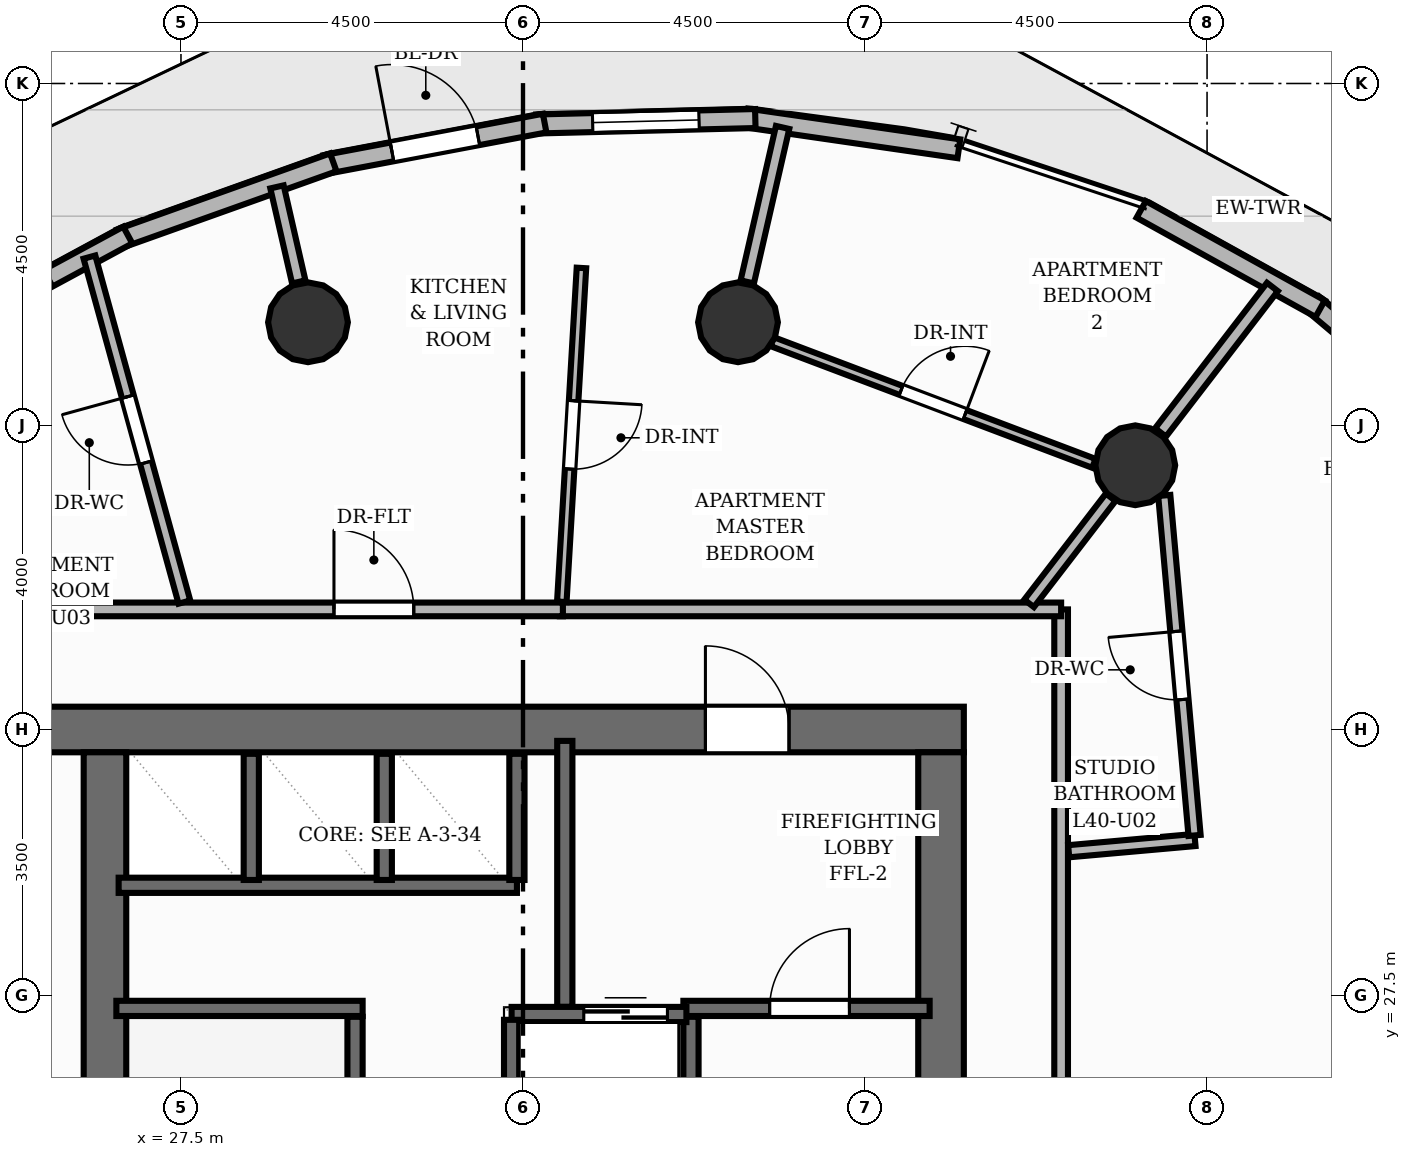
"""IFC4 building model, lengths in metres.
Left out: names, types, materials, properties, quantities, classifications, styles, units other than length and angle.
Written with IfcOpenShell. Run it as: python <this file> out.ifc"""

import sys

from ifc_helpers import new_model, si_unit, direction, frame, frame_2d, origin, origin_2d, place, context, subcontext, project, spatial, rectangle, circle, extrude, element, fill, save


model = new_model("IFC4")
c1 = context("Model", 3, precision=1e-05, world=origin(), true_north=direction((0.0, 1.0)))
c2 = subcontext(c1, "Body", "Model", "MODEL_VIEW")
j1 = project(units=[si_unit("LENGTHUNIT", "METRE"), si_unit("PLANEANGLEUNIT", "RADIAN")], contexts=[c1])
p1 = place(None, origin())
s1 = spatial("IfcSite", under=j1, at=p1, CompositionType="ELEMENT")
p2 = place(p1, origin())
s2 = spatial("IfcBuilding", under=s1, at=p2, CompositionType="ELEMENT")
p3 = place(p2, frame((0.0, 0.0, 136.16)))
s3 = spatial("IfcBuildingStorey", under=s2, at=p3, CompositionType="ELEMENT", Elevation=136.16)
p4 = place(p3, frame((22.7, 31.0, 0.0), z_axis=(0.0, 0.0, 1.0), x_axis=(1.0, 0.0, 0.0)))
e1 = element("IfcWall", 1, at=p4, inside=s3, PredefinedType="SHEAR", context=c2, shape_type="SweptSolid", body=[
    extrude(rectangle(XDim=15.1, YDim=0.6, at=frame_2d((7.55, 0.0))), origin(), (0.0, 0.0, 1.0), 3.2),
])
p5 = place(p4, frame((11.7, 0.0, 0.0)))
e2 = element("IfcOpeningElement", 2, at=p5, cuts=e1, PredefinedType="OPENING", context=c2, shape_type="SweptSolid", body=[
    extrude(rectangle(XDim=1.1, YDim=2.15, at=frame_2d((0.55, 1.075))), frame((0.0, 0.31, 0.0), z_axis=(0.0, -1.0, 0.0), x_axis=(1.0, 0.0, 0.0)), (0.0, 0.0, 1.0), 0.62),
])
p6 = place(p3, frame((37.5, 17.3, 0.0), z_axis=(0.0, 0.0, 1.0), x_axis=(0.0, 1.0, 0.0)))
e3 = element("IfcWall", 3, at=p6, inside=s3, PredefinedType="SHEAR", context=c2, shape_type="SweptSolid", body=[
    extrude(rectangle(XDim=13.4, YDim=0.6, at=frame_2d((6.7, 0.0))), origin(), (0.0, 0.0, 1.0), 3.2),
])
p7 = place(p3, frame((26.5, 17.3, 0.0), z_axis=(0.0, 0.0, 1.0), x_axis=(0.0, 1.0, 0.0)))
e4 = element("IfcWall", 4, at=p7, inside=s3, PredefinedType="SHEAR", context=c2, shape_type="SweptSolid", body=[
    extrude(rectangle(XDim=13.4, YDim=0.56, at=frame_2d((6.7, 0.0))), origin(), (0.0, 0.0, 1.0), 3.2),
])
for number, where, z_axis, x_axis in (
    (5, (40.056, 34.477, 0.0), (0.0, 0.0, 1.0), (1.0, 0.0, 0.0)),
    (6, (34.829, 36.358, 0.0), (0.0, 0.0, 1.0), (1.0, 0.0, 0.0)),
    (7, (29.171, 36.358, 0.0), (0.0, 0.0, 1.0), (1.0, 0.0, 0.0)),
):
    element("IfcColumn", number, at=place(p3, frame(where, z_axis=z_axis, x_axis=x_axis)), inside=s3, PredefinedType="COLUMN", context=c2, shape_type="SweptSolid", body=[
        extrude(circle(Radius=0.525, at=origin_2d()), origin(), (0.0, 0.0, 1.0), 3.2),
    ])
p8 = place(p3, frame((42.395, 36.601, 0.0), z_axis=(0.0, 0.0, 1.0), x_axis=(0.764825125467, -0.644237943197, 0.0)))
e8 = element("IfcWall", 8, at=p8, inside=s3, PredefinedType="SOLIDWALL", context=c2, shape_type="SweptSolid", body=[
    extrude(rectangle(XDim=2.648, YDim=0.25, at=frame_2d((1.324, 0.0))), origin(), (0.0, 0.0, 1.0), 2.96),
])
p9 = place(p8, frame((0.624, 0.0, 0.85)))
e9 = element("IfcOpeningElement", 9, at=p9, cuts=e8, PredefinedType="OPENING", context=c2, shape_type="SweptSolid", body=[
    extrude(rectangle(XDim=1.4, YDim=1.55, at=frame_2d((0.7, 0.775))), frame((0.0, 0.135, 0.0), z_axis=(0.0, -1.0, 0.0), x_axis=(1.0, 0.0, 0.0)), (0.0, 0.0, 1.0), 0.27),
])
p10 = place(p3, frame((40.134, 37.844, 0.0), z_axis=(0.0, 0.0, 1.0), x_axis=(0.874341102682, -0.485311895755, 0.0)))
e10 = element("IfcWall", 10, at=p10, inside=s3, PredefinedType="SOLIDWALL", context=c2, shape_type="SweptSolid", body=[
    extrude(rectangle(XDim=2.693, YDim=0.25, at=frame_2d((1.346, 0.0))), origin(), (0.0, 0.0, 1.0), 2.96),
])
p11 = place(p3, frame((34.946, 39.045, 0.0), z_axis=(0.0, 0.0, 1.0), x_axis=(0.98966505468, -0.143398324768, 0.0)))
e11 = element("IfcWall", 11, at=p11, inside=s3, PredefinedType="SOLIDWALL", context=c2, shape_type="SweptSolid", body=[
    extrude(rectangle(XDim=2.818, YDim=0.25, at=frame_2d((1.409, 0.0))), origin(), (0.0, 0.0, 1.0), 2.96),
])
p12 = place(p3, frame((32.176, 38.967, 0.0), z_axis=(0.0, 0.0, 1.0), x_axis=(0.999687646408, 0.02499219116, 0.0)))
e12 = element("IfcWall", 12, at=p12, inside=s3, PredefinedType="SOLIDWALL", context=c2, shape_type="SweptSolid", body=[
    extrude(rectangle(XDim=2.882, YDim=0.25, at=frame_2d((1.441, 0.0))), origin(), (0.0, 0.0, 1.0), 2.96),
])
p13 = place(p12, frame((0.741, 0.0, 0.85)))
e13 = element("IfcOpeningElement", 13, at=p13, cuts=e12, PredefinedType="OPENING", context=c2, shape_type="SweptSolid", body=[
    extrude(rectangle(XDim=1.4, YDim=1.55, at=frame_2d((0.7, 0.775))), frame((0.0, 0.135, 0.0), z_axis=(0.0, -1.0, 0.0), x_axis=(1.0, 0.0, 0.0)), (0.0, 0.0, 1.0), 0.27),
])
p14 = place(p3, frame((29.399, 38.434, 0.0), z_axis=(0.0, 0.0, 1.0), x_axis=(0.982637070109, 0.185538105108, 0.0)))
e14 = element("IfcWall", 14, at=p14, inside=s3, PredefinedType="SOLIDWALL", context=c2, shape_type="SweptSolid", body=[
    extrude(rectangle(XDim=2.937, YDim=0.25, at=frame_2d((1.469, 0.0))), origin(), (0.0, 0.0, 1.0), 2.96),
])
p15 = place(p14, frame((0.893, 0.0, 0.0)))
e15 = element("IfcOpeningElement", 15, at=p15, cuts=e14, PredefinedType="OPENING", context=c2, shape_type="SweptSolid", body=[
    extrude(rectangle(XDim=1.15, YDim=2.2, at=frame_2d((0.575, 1.1))), frame((0.0, 0.135, 0.0), z_axis=(0.0, -1.0, 0.0), x_axis=(1.0, 0.0, 0.0)), (0.0, 0.0, 1.0), 0.27),
])
p16 = place(p3, frame((26.701, 37.461, 0.0), z_axis=(0.0, 0.0, 1.0), x_axis=(0.94175304307, 0.33630522724, 0.0)))
e16 = element("IfcWall", 16, at=p16, inside=s3, PredefinedType="SOLIDWALL", context=c2, shape_type="SweptSolid", body=[
    extrude(rectangle(XDim=2.977, YDim=0.25, at=frame_2d((1.489, 0.0))), origin(), (0.0, 0.0, 1.0), 2.96),
])
p17 = place(p3, frame((24.163, 36.079, 0.0), z_axis=(0.0, 0.0, 1.0), x_axis=(0.879567466611, 0.475774181393, 0.0)))
e17 = element("IfcWall", 17, at=p17, inside=s3, PredefinedType="SOLIDWALL", context=c2, shape_type="SweptSolid", body=[
    extrude(rectangle(XDim=2.998, YDim=0.25, at=frame_2d((1.499, 0.0))), origin(), (0.0, 0.0, 1.0), 2.96),
])
p18 = place(p17, frame((0.175, 0.0, 0.85)))
e18 = element("IfcOpeningElement", 18, at=p18, cuts=e17, PredefinedType="OPENING", context=c2, shape_type="SweptSolid", body=[
    extrude(rectangle(XDim=1.65, YDim=1.55, at=frame_2d((0.825, 0.775))), frame((0.0, 0.135, 0.0), z_axis=(0.0, -1.0, 0.0), x_axis=(1.0, 0.0, 0.0)), (0.0, 0.0, 1.0), 0.27),
])
p19 = place(p3, frame((29.79, 20.78, 0.0), z_axis=(0.0, 0.0, 1.0), x_axis=(0.0, 1.0, 0.0)))
e19 = element("IfcWall", 19, at=p19, inside=s3, PredefinedType="SHEAR", context=c2, shape_type="SweptSolid", body=[
    extrude(rectangle(XDim=6.44, YDim=0.2, at=frame_2d((3.22, 0.0))), origin(), (0.0, 0.0, 1.0), 3.2),
])
p20 = place(p3, frame((26.65, 27.33, 0.0), z_axis=(0.0, 0.0, 1.0), x_axis=(1.0, 0.0, 0.0)))
e20 = element("IfcWall", 20, at=p20, inside=s3, PredefinedType="SHEAR", context=c2, shape_type="SweptSolid", body=[
    extrude(rectangle(XDim=3.24, YDim=0.2, at=frame_2d((1.62, 0.0))), origin(), (0.0, 0.0, 1.0), 3.2),
])
p21 = place(p3, frame((34.21, 20.78, 0.0), z_axis=(0.0, 0.0, 1.0), x_axis=(0.0, 1.0, 0.0)))
e21 = element("IfcWall", 21, at=p21, inside=s3, PredefinedType="SHEAR", context=c2, shape_type="SweptSolid", body=[
    extrude(rectangle(XDim=6.44, YDim=0.2, at=frame_2d((3.22, 0.0))), origin(), (0.0, 0.0, 1.0), 3.2),
])
p22 = place(p3, frame((34.11, 27.33, 0.0), z_axis=(0.0, 0.0, 1.0), x_axis=(1.0, 0.0, 0.0)))
e22 = element("IfcWall", 22, at=p22, inside=s3, PredefinedType="SHEAR", context=c2, shape_type="SweptSolid", body=[
    extrude(rectangle(XDim=3.24, YDim=0.2, at=frame_2d((1.62, 0.0))), origin(), (0.0, 0.0, 1.0), 3.2),
])
p23 = place(p22, frame((1.135, 0.0, 0.0)))
e23 = element("IfcOpeningElement", 23, at=p23, cuts=e22, PredefinedType="OPENING", context=c2, shape_type="SweptSolid", body=[
    extrude(rectangle(XDim=1.05, YDim=2.15, at=frame_2d((0.525, 1.075))), frame((0.0, 0.11, 0.0), z_axis=(0.0, -1.0, 0.0), x_axis=(1.0, 0.0, 0.0)), (0.0, 0.0, 1.0), 0.22),
])
p24 = place(p3, frame((32.55, 27.35, 0.0), z_axis=(0.0, 0.0, 1.0), x_axis=(0.0, 1.0, 0.0)))
e24 = element("IfcWall", 24, at=p24, inside=s3, PredefinedType="SHEAR", context=c2, shape_type="SweptSolid", body=[
    extrude(rectangle(XDim=3.5, YDim=0.2, at=frame_2d((1.75, 0.0))), origin(), (0.0, 0.0, 1.0), 3.2),
])
p25 = place(p3, frame((31.85, 27.25, 0.0), z_axis=(0.0, 0.0, 1.0), x_axis=(1.0, 0.0, 0.0)))
e25 = element("IfcWall", 25, at=p25, inside=s3, PredefinedType="SHEAR", context=c2, shape_type="SweptSolid", body=[
    extrude(rectangle(XDim=2.3, YDim=0.2, at=frame_2d((1.15, 0.0))), origin(), (0.0, 0.0, 1.0), 3.2),
])
p26 = place(p25, frame((0.95, 0.0, 0.0)))
e26 = element("IfcOpeningElement", 26, at=p26, cuts=e25, PredefinedType="OPENING", context=c2, shape_type="SweptSolid", body=[
    extrude(rectangle(XDim=1.1, YDim=2.15, at=frame_2d((0.55, 1.075))), frame((0.0, 0.11, 0.0), z_axis=(0.0, -1.0, 0.0), x_axis=(1.0, 0.0, 0.0)), (0.0, 0.0, 1.0), 0.22),
])
p27 = place(p3, frame((31.85, 25.47, 0.0), z_axis=(0.0, 0.0, 1.0), x_axis=(0.0, 1.0, 0.0)))
e27 = element("IfcWall", 27, at=p27, inside=s3, PredefinedType="SHEAR", context=c2, shape_type="SweptSolid", body=[
    extrude(rectangle(XDim=1.71, YDim=0.2, at=frame_2d((0.855, 0.0))), origin(), (0.0, 0.0, 1.0), 3.2),
])
p28 = place(p3, frame((26.68, 28.95, 0.0), z_axis=(0.0, 0.0, 1.0), x_axis=(1.0, 0.0, 0.0)))
e28 = element("IfcWall", 28, at=p28, inside=s3, PredefinedType="SHEAR", context=c2, shape_type="SweptSolid", body=[
    extrude(rectangle(XDim=5.24, YDim=0.2, at=frame_2d((2.62, 0.0))), origin(), (0.0, 0.0, 1.0), 3.2),
])
for number, where, z_axis, x_axis in (
    (29, (31.92, 29.02, 0.0), (0.0, 0.0, 1.0), (0.0, 1.0, 0.0)),
    (30, (28.425, 29.02, 0.0), (0.0, 0.0, 1.0), (0.0, 1.0, 0.0)),
    (31, (30.175, 29.02, 0.0), (0.0, 0.0, 1.0), (0.0, 1.0, 0.0)),
):
    element("IfcWall", number, at=place(p3, frame(where, z_axis=z_axis, x_axis=x_axis)), inside=s3, PredefinedType="SHEAR", context=c2, shape_type="SweptSolid", body=[
        extrude(rectangle(XDim=1.66, YDim=0.2, at=frame_2d((0.83, 0.0))), origin(), (0.0, 0.0, 1.0), 3.2),
    ])
p29 = place(p3, frame((40.388, 34.908, 0.0), z_axis=(0.0, 0.0, 1.0), x_axis=(0.609549509747, 0.79274800231, 0.0)))
e32 = element("IfcWall", 32, at=p29, inside=s3, PredefinedType="PARTITIONING", context=c2, shape_type="SweptSolid", body=[
    extrude(rectangle(XDim=2.415, YDim=0.18, at=frame_2d((1.208, 0.0))), origin(), (0.0, 0.0, 1.0), 2.336),
])
p30 = place(p3, frame((34.95, 36.889, 0.0), z_axis=(0.0, 0.0, 1.0), x_axis=(0.223063251486, 0.974803973031, 0.0)))
e33 = element("IfcWall", 33, at=p30, inside=s3, PredefinedType="PARTITIONING", context=c2, shape_type="SweptSolid", body=[
    extrude(rectangle(XDim=2.085, YDim=0.18, at=frame_2d((1.042, 0.0))), origin(), (0.0, 0.0, 1.0), 2.336),
])
p31 = place(p3, frame((29.05, 36.889, 0.0), z_axis=(0.0, 0.0, 1.0), x_axis=(-0.223093561241, 0.974797036789, 0.0)))
e34 = element("IfcWall", 34, at=p31, inside=s3, PredefinedType="PARTITIONING", context=c2, shape_type="SweptSolid", body=[
    extrude(rectangle(XDim=1.282, YDim=0.18, at=frame_2d((0.641, 0.0))), origin(), (0.0, 0.0, 1.0), 2.336),
])
p32 = place(p3, frame((39.08, 32.58, 0.0), z_axis=(0.0, 0.0, 1.0), x_axis=(0.0, -1.0, 0.0)))
e35 = element("IfcWall", 35, at=p32, inside=s3, PredefinedType="PARTITIONING", context=c2, shape_type="SweptSolid", body=[
    extrude(rectangle(XDim=17.16, YDim=0.18, at=frame_2d((8.58, 0.0))), origin(), (0.0, 0.0, 1.0), 2.955),
])
p33 = place(p32, frame((9.64, 0.0, 0.0)))
e36 = element("IfcOpeningElement", 36, at=p33, cuts=e35, PredefinedType="OPENING", context=c2, shape_type="SweptSolid", body=[
    extrude(rectangle(XDim=1.05, YDim=2.15, at=frame_2d((0.525, 1.075))), frame((0.0, 0.1, 0.0), z_axis=(0.0, -1.0, 0.0), x_axis=(1.0, 0.0, 0.0)), (0.0, 0.0, 1.0), 0.2),
])
p34 = place(p3, frame((32.485, 32.58, 0.0), z_axis=(0.0, 0.0, 1.0), x_axis=(1.0, 0.0, 0.0)))
e37 = element("IfcWall", 37, at=p34, inside=s3, PredefinedType="PARTITIONING", context=c2, shape_type="SweptSolid", body=[
    extrude(rectangle(XDim=6.595, YDim=0.18, at=frame_2d((3.298, 0.0))), origin(), (0.0, 0.0, 1.0), 2.955),
])
p35 = place(p3, frame((21.42, 32.58, 0.0), z_axis=(0.0, 0.0, 1.0), x_axis=(1.0, 0.0, 0.0)))
e38 = element("IfcWall", 38, at=p35, inside=s3, PredefinedType="PARTITIONING", context=c2, shape_type="SweptSolid", body=[
    extrude(rectangle(XDim=11.105, YDim=0.18, at=frame_2d((5.552, 0.0))), origin(), (0.0, 0.0, 1.0), 2.955),
])
p36 = place(p35, frame((8.093, 0.0, 0.0)))
e39 = element("IfcOpeningElement", 39, at=p36, cuts=e38, PredefinedType="OPENING", context=c2, shape_type="SweptSolid", body=[
    extrude(rectangle(XDim=1.05, YDim=2.15, at=frame_2d((0.525, 1.075))), frame((0.0, 0.1, 0.0), z_axis=(0.0, -1.0, 0.0), x_axis=(1.0, 0.0, 0.0)), (0.0, 0.0, 1.0), 0.2),
])
p37 = place(p3, frame((39.18, 29.398, 0.0), z_axis=(0.0, 0.0, 1.0), x_axis=(0.996058284503, 0.088701149215, 0.0)))
e40 = element("IfcWall", 40, at=p37, inside=s3, PredefinedType="PLUMBINGWALL", context=c2, shape_type="SweptSolid", body=[
    extrude(rectangle(XDim=1.668, YDim=0.16, at=frame_2d((0.834, 0.0))), origin(), (0.0, 0.0, 1.0), 2.955),
])
p38 = place(p3, frame((40.836, 29.606, 0.0), z_axis=(0.0, 0.0, 1.0), x_axis=(-0.08877110741, 0.996052052098, 0.0)))
e41 = element("IfcWall", 41, at=p38, inside=s3, PredefinedType="PLUMBINGWALL", context=c2, shape_type="SweptSolid", body=[
    extrude(rectangle(XDim=4.491, YDim=0.16, at=frame_2d((2.246, 0.0))), origin(), (0.0, 0.0, 1.0), 2.955),
])
p39 = place(p38, frame((1.796, 0.0, 0.0)))
e42 = element("IfcOpeningElement", 42, at=p39, cuts=e41, PredefinedType="OPENING", context=c2, shape_type="SweptSolid", body=[
    extrude(rectangle(XDim=0.9, YDim=2.1, at=frame_2d((0.45, 1.05))), frame((0.0, 0.09, 0.0), z_axis=(0.0, -1.0, 0.0), x_axis=(1.0, 0.0, 0.0)), (0.0, 0.0, 1.0), 0.18),
])
p40 = place(p3, frame((38.658, 32.659, 0.0), z_axis=(0.0, 0.0, 1.0), x_axis=(0.609536601946, 0.792757927042, 0.0)))
e43 = element("IfcWall", 43, at=p40, inside=s3, PredefinedType="PLUMBINGWALL", context=c2, shape_type="SweptSolid", body=[
    extrude(rectangle(XDim=1.761, YDim=0.16, at=frame_2d((0.881, 0.0))), origin(), (0.0, 0.0, 1.0), 2.336),
])
p41 = place(p3, frame((27.545, 32.677, 0.0), z_axis=(0.0, 0.0, 1.0), x_axis=(-0.265393905211, 0.964140070258, 0.0)))
e44 = element("IfcWall", 44, at=p41, inside=s3, PredefinedType="PLUMBINGWALL", context=c2, shape_type="SweptSolid", body=[
    extrude(rectangle(XDim=4.708, YDim=0.16, at=frame_2d((2.354, 0.0))), origin(), (0.0, 0.0, 1.0), 2.955),
])
p42 = place(p41, frame((1.904, 0.0, 0.0)))
e45 = element("IfcOpeningElement", 45, at=p42, cuts=e44, PredefinedType="OPENING", context=c2, shape_type="SweptSolid", body=[
    extrude(rectangle(XDim=0.9, YDim=2.1, at=frame_2d((0.45, 1.05))), frame((0.0, 0.09, 0.0), z_axis=(0.0, -1.0, 0.0), x_axis=(1.0, 0.0, 0.0)), (0.0, 0.0, 1.0), 0.18),
])
p43 = place(p3, frame((32.769, 37.073, 0.0), z_axis=(0.0, 0.0, 1.0), x_axis=(-0.058751291398, -0.998272651012, 0.0)))
e46 = element("IfcWall", 46, at=p43, inside=s3, PredefinedType="PARTITIONING", context=c2, shape_type="SweptSolid", body=[
    extrude(rectangle(XDim=4.401, YDim=0.125, at=frame_2d((2.2, 0.0))), origin(), (0.0, 0.0, 1.0), 2.692),
])
p44 = place(p43, frame((1.75, 0.0, 0.0)))
e47 = element("IfcOpeningElement", 47, at=p44, cuts=e46, PredefinedType="OPENING", context=c2, shape_type="SweptSolid", body=[
    extrude(rectangle(XDim=0.9, YDim=2.1, at=frame_2d((0.45, 1.05))), frame((0.0, 0.073, 0.0), z_axis=(0.0, -1.0, 0.0), x_axis=(1.0, 0.0, 0.0)), (0.0, 0.0, 1.0), 0.145),
])
p45 = place(p3, frame((35.278, 36.103, 0.0), z_axis=(0.0, 0.0, 1.0), x_axis=(0.935309901838, -0.353829602385, 0.0)))
e48 = element("IfcWall", 48, at=p45, inside=s3, PredefinedType="PARTITIONING", context=c2, shape_type="SweptSolid", body=[
    extrude(rectangle(XDim=4.526, YDim=0.125, at=frame_2d((2.263, 0.0))), origin(), (0.0, 0.0, 1.0), 2.411),
])
p46 = place(p45, frame((1.813, 0.0, 0.0)))
e49 = element("IfcOpeningElement", 49, at=p46, cuts=e48, PredefinedType="OPENING", context=c2, shape_type="SweptSolid", body=[
    extrude(rectangle(XDim=0.9, YDim=2.1, at=frame_2d((0.45, 1.05))), frame((0.0, 0.073, 0.0), z_axis=(0.0, -1.0, 0.0), x_axis=(1.0, 0.0, 0.0)), (0.0, 0.0, 1.0), 0.145),
])
p47 = place(p15, origin())
e50 = element("IfcDoor", 50, at=p47, inside=s3, OperationType="SINGLE_SWING_LEFT", PredefinedType="DOOR", context=c2, shape_type="SweptSolid", body=[
    extrude(rectangle(XDim=1.15, YDim=2.2, at=frame_2d((0.575, 1.1))), frame((0.0, 0.025, 0.0), z_axis=(0.0, -1.0, 0.0), x_axis=(1.0, 0.0, 0.0)), (0.0, 0.0, 1.0), 0.05),
])
fill(e15, e50)
p48 = place(p13, origin())
e51 = element("IfcWindow", 51, at=p48, inside=s3, PartitioningType="SINGLE_PANEL", PredefinedType="WINDOW", context=c2, shape_type="SweptSolid", body=[
    extrude(rectangle(XDim=1.4, YDim=1.55, at=frame_2d((0.7, 0.775))), frame((0.0, 0.03, 0.0), z_axis=(0.0, -1.0, 0.0), x_axis=(1.0, 0.0, 0.0)), (0.0, 0.0, 1.0), 0.06),
])
fill(e13, e51)
p49 = place(p23, origin())
e52 = element("IfcDoor", 52, at=p49, inside=s3, OperationType="SINGLE_SWING_RIGHT", PredefinedType="DOOR", context=c2, shape_type="SweptSolid", body=[
    extrude(rectangle(XDim=1.05, YDim=2.15, at=frame_2d((0.525, 1.075))), frame((0.0, 0.025, 0.0), z_axis=(0.0, -1.0, 0.0), x_axis=(1.0, 0.0, 0.0)), (0.0, 0.0, 1.0), 0.05),
])
fill(e23, e52)
p50 = place(p5, origin())
e53 = element("IfcDoor", 53, at=p50, inside=s3, OperationType="SINGLE_SWING_LEFT", PredefinedType="DOOR", context=c2, shape_type="SweptSolid", body=[
    extrude(rectangle(XDim=1.1, YDim=2.15, at=frame_2d((0.55, 1.075))), frame((0.0, 0.025, 0.0), z_axis=(0.0, -1.0, 0.0), x_axis=(1.0, 0.0, 0.0)), (0.0, 0.0, 1.0), 0.05),
])
fill(e2, e53)
p51 = place(p26, origin())
e54 = element("IfcDoor", 54, at=p51, inside=s3, OperationType="DOUBLE_DOOR_SLIDING", PredefinedType="DOOR", context=c2, shape_type="SweptSolid", body=[
    extrude(rectangle(XDim=1.1, YDim=2.15, at=frame_2d((0.55, 1.075))), frame((0.0, 0.025, 0.0), z_axis=(0.0, -1.0, 0.0), x_axis=(1.0, 0.0, 0.0)), (0.0, 0.0, 1.0), 0.05),
])
fill(e26, e54)
p52 = place(p39, origin())
e55 = element("IfcDoor", 55, at=p52, inside=s3, OperationType="SINGLE_SWING_RIGHT", PredefinedType="DOOR", context=c2, shape_type="SweptSolid", body=[
    extrude(rectangle(XDim=0.9, YDim=2.1, at=frame_2d((0.45, 1.05))), frame((0.0, 0.025, 0.0), z_axis=(0.0, -1.0, 0.0), x_axis=(1.0, 0.0, 0.0)), (0.0, 0.0, 1.0), 0.05),
])
fill(e42, e55)
p53 = place(p36, origin())
e56 = element("IfcDoor", 56, at=p53, inside=s3, OperationType="SINGLE_SWING_LEFT", PredefinedType="DOOR", context=c2, shape_type="SweptSolid", body=[
    extrude(rectangle(XDim=1.05, YDim=2.15, at=frame_2d((0.525, 1.075))), frame((0.0, 0.025, 0.0), z_axis=(0.0, -1.0, 0.0), x_axis=(1.0, 0.0, 0.0)), (0.0, 0.0, 1.0), 0.05),
])
fill(e39, e56)
p54 = place(p42, origin())
e57 = element("IfcDoor", 57, at=p54, inside=s3, OperationType="SINGLE_SWING_RIGHT", PredefinedType="DOOR", context=c2, shape_type="SweptSolid", body=[
    extrude(rectangle(XDim=0.9, YDim=2.1, at=frame_2d((0.45, 1.05))), frame((0.0, 0.025, 0.0), z_axis=(0.0, -1.0, 0.0), x_axis=(1.0, 0.0, 0.0)), (0.0, 0.0, 1.0), 0.05),
])
fill(e45, e57)
p55 = place(p44, origin())
e58 = element("IfcDoor", 58, at=p55, inside=s3, OperationType="SINGLE_SWING_LEFT", PredefinedType="DOOR", context=c2, shape_type="SweptSolid", body=[
    extrude(rectangle(XDim=0.9, YDim=2.1, at=frame_2d((0.45, 1.05))), frame((0.0, 0.025, 0.0), z_axis=(0.0, -1.0, 0.0), x_axis=(1.0, 0.0, 0.0)), (0.0, 0.0, 1.0), 0.05),
])
fill(e47, e58)
p56 = place(p46, origin())
e59 = element("IfcDoor", 59, at=p56, inside=s3, OperationType="SINGLE_SWING_RIGHT", PredefinedType="DOOR", context=c2, shape_type="SweptSolid", body=[
    extrude(rectangle(XDim=0.9, YDim=2.1, at=frame_2d((0.45, 1.05))), frame((0.0, 0.025, 0.0), z_axis=(0.0, -1.0, 0.0), x_axis=(1.0, 0.0, 0.0)), (0.0, 0.0, 1.0), 0.05),
])
fill(e49, e59)
save(model, sys.argv[1])
